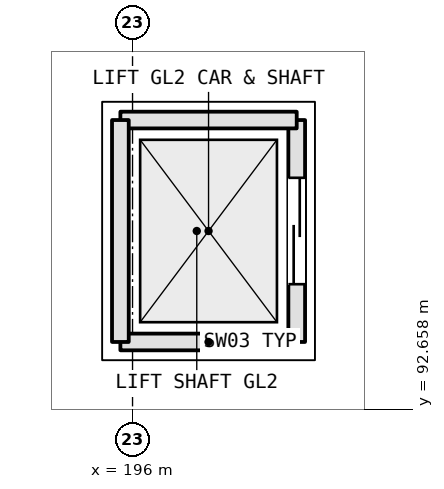
"""IFC4 building model, lengths in metres.
Left out: names, types, materials, properties, quantities, classifications, styles, units other than length and angle.
Written with IfcOpenShell. Run it as: python <this file> out.ifc"""

import sys

from ifc_helpers import new_model, si_unit, direction, frame, frame_2d, origin, place, context, subcontext, project, spatial, rectangle, extrude, element, fill, save


model = new_model("IFC4")
c1 = context("Model", 3, precision=1e-05, world=origin(), true_north=direction((0.0, 1.0)))
c2 = subcontext(c1, "Body", "Model", "MODEL_VIEW")
j1 = project(units=[si_unit("LENGTHUNIT", "METRE"), si_unit("PLANEANGLEUNIT", "RADIAN")], contexts=[c1])
p1 = place(None, origin())
s1 = spatial("IfcSite", under=j1, at=p1, CompositionType="ELEMENT")
p2 = place(p1, origin())
s2 = spatial("IfcBuilding", under=s1, at=p2, CompositionType="ELEMENT")
p3 = place(p2, origin())
s3 = spatial("IfcBuildingStorey", under=s2, at=p3, CompositionType="ELEMENT", Elevation=0.0)
p4 = place(p3, frame((195.84, 93.54, -1.1), z_axis=(0.0, 0.0, 1.0), x_axis=(1.0, 0.0, 0.0)))
e1 = element("IfcWall", 1, at=p4, inside=s3, PredefinedType="SHEAR", context=c2, shape_type="SweptSolid", body=[
    extrude(rectangle(XDim=2.32, YDim=0.22, at=frame_2d((1.16, 0.0))), origin(), (0.0, 0.0, 1.0), 6.24),
])
p5 = place(p3, frame((198.16, 93.54, -1.1), z_axis=(0.0, 0.0, 1.0), x_axis=(0.0, 1.0, 0.0)))
e2 = element("IfcWall", 2, at=p5, inside=s3, PredefinedType="SHEAR", context=c2, shape_type="SweptSolid", body=[
    extrude(rectangle(XDim=2.92, YDim=0.22, at=frame_2d((1.46, 0.0))), origin(), (0.0, 0.0, 1.0), 6.24),
])
p6 = place(p5, frame((0.76, 0.0, 1.1)))
e3 = element("IfcOpeningElement", 3, at=p6, cuts=e2, PredefinedType="OPENING", context=c2, shape_type="SweptSolid", body=[
    extrude(rectangle(XDim=1.4, YDim=2.3, at=frame_2d((0.7, 1.15))), frame((0.0, 0.12, 0.0), z_axis=(0.0, -1.0, 0.0), x_axis=(1.0, 0.0, 0.0)), (0.0, 0.0, 1.0), 0.24),
])
p7 = place(p3, frame((198.16, 96.46, -1.1), z_axis=(0.0, 0.0, 1.0), x_axis=(-1.0, 0.0, 0.0)))
e4 = element("IfcWall", 4, at=p7, inside=s3, PredefinedType="SHEAR", context=c2, shape_type="SweptSolid", body=[
    extrude(rectangle(XDim=2.32, YDim=0.22, at=frame_2d((1.16, 0.0))), origin(), (0.0, 0.0, 1.0), 6.24),
])
p8 = place(p3, frame((195.84, 96.46, -1.1), z_axis=(0.0, 0.0, 1.0), x_axis=(0.0, -1.0, 0.0)))
e5 = element("IfcWall", 5, at=p8, inside=s3, PredefinedType="SHEAR", context=c2, shape_type="SweptSolid", body=[
    extrude(rectangle(XDim=2.92, YDim=0.22, at=frame_2d((1.46, 0.0))), origin(), (0.0, 0.0, 1.0), 6.24),
])
p9 = place(p6, origin())
e6 = element("IfcDoor", 6, at=p9, inside=s3, OperationType="DOUBLE_DOOR_SLIDING", PredefinedType="DOOR", context=c2, shape_type="SweptSolid", body=[
    extrude(rectangle(XDim=1.4, YDim=2.3, at=frame_2d((0.7, 1.15))), frame((0.0, 0.025, 0.0), z_axis=(0.0, -1.0, 0.0), x_axis=(1.0, 0.0, 0.0)), (0.0, 0.0, 1.0), 0.05),
])
fill(e3, e6)
save(model, sys.argv[1])
